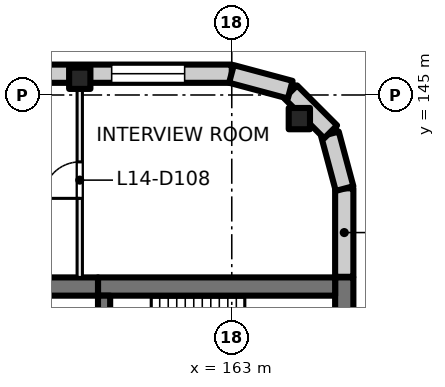
"""IFC4 building model, lengths in metres.
Left out: names, types, materials, properties, quantities, classifications, styles, units other than length and angle.
Written with IfcOpenShell. Run it as: python <this file> out.ifc"""

import sys

from ifc_helpers import new_model, si_unit, direction, frame, frame_2d, origin, origin_2d, place, context, subcontext, project, spatial, rectangle, extrude, element, fill, save


model = new_model("IFC4")
c1 = context("Model", 3, precision=1e-05, world=origin(), true_north=direction((0.0, 1.0)))
c2 = subcontext(c1, "Body", "Model", "MODEL_VIEW")
j1 = project(units=[si_unit("LENGTHUNIT", "METRE"), si_unit("PLANEANGLEUNIT", "RADIAN")], contexts=[c1])
p1 = place(None, origin())
s1 = spatial("IfcSite", under=j1, at=p1, CompositionType="ELEMENT")
p2 = place(p1, origin())
s2 = spatial("IfcBuilding", under=s1, at=p2, CompositionType="ELEMENT")
p3 = place(p2, frame((0.0, 0.0, 63.5)))
s3 = spatial("IfcBuildingStorey", under=s2, at=p3, CompositionType="ELEMENT", Elevation=63.5)
for number, where, z_axis, x_axis in (
    (1, (165.223, 144.223, 0.0), (0.0, 0.0, 1.0), (1.0, 0.0, 0.0)),
    (2, (158.0, 145.55, 0.0), (0.0, 0.0, 1.0), (1.0, 0.0, 0.0)),
):
    element("IfcColumn", number, at=place(p3, frame(where, z_axis=z_axis, x_axis=x_axis)), inside=s3, PredefinedType="COLUMN", context=c2, shape_type="SweptSolid", body=[
        extrude(rectangle(XDim=0.7, YDim=0.7, at=origin_2d()), origin(), (0.0, 0.0, 1.0), 4.0),
    ])
p4 = place(p3, frame((166.7, 139.0, 0.0), z_axis=(0.0, 0.0, 1.0), x_axis=(0.0, -1.0, 0.0)))
e3 = element("IfcWall", 3, at=p4, inside=s3, PredefinedType="SHEAR", context=c2, shape_type="SweptSolid", body=[
    extrude(rectangle(XDim=3.8, YDim=0.6, at=frame_2d((1.9, 0.0))), origin(), (0.0, 0.0, 1.0), 4.0),
])
p5 = place(p3, frame((166.4, 138.7, 0.0), z_axis=(0.0, 0.0, 1.0), x_axis=(-1.0, 0.0, 0.0)))
e4 = element("IfcWall", 4, at=p5, inside=s3, PredefinedType="SHEAR", context=c2, shape_type="SweptSolid", body=[
    extrude(rectangle(XDim=7.8, YDim=0.6, at=frame_2d((3.9, 0.0))), origin(), (0.0, 0.0, 1.0), 4.0),
])
p6 = place(p3, frame((158.6, 138.7, 0.0), z_axis=(0.0, 0.0, 1.0), x_axis=(-1.0, 0.0, 0.0)))
e5 = element("IfcWall", 5, at=p6, inside=s3, PredefinedType="SHEAR", context=c2, shape_type="SweptSolid", body=[
    extrude(rectangle(XDim=4.6, YDim=0.6, at=frame_2d((2.3, 0.0))), origin(), (0.0, 0.0, 1.0), 4.0),
])
p7 = place(p3, frame((158.8, 138.4, 0.0), z_axis=(0.0, 0.0, 1.0), x_axis=(0.0, -1.0, 0.0)))
e6 = element("IfcWall", 6, at=p7, inside=s3, PredefinedType="SHEAR", context=c2, shape_type="SweptSolid", body=[
    extrude(rectangle(XDim=2.8, YDim=0.4, at=frame_2d((1.4, 0.0))), origin(), (0.0, 0.0, 1.0), 4.0),
])
p8 = place(p7, frame((0.9, 0.0, 0.0)))
e7 = element("IfcOpeningElement", 7, at=p8, cuts=e6, PredefinedType="OPENING", context=c2, shape_type="SweptSolid", body=[
    extrude(rectangle(XDim=1.0, YDim=2.1, at=frame_2d((0.5, 1.05))), frame((0.0, 0.21, 0.0), z_axis=(0.0, -1.0, 0.0), x_axis=(1.0, 0.0, 0.0)), (0.0, 0.0, 1.0), 0.42),
])
p9 = place(p3, frame((131.07, 145.7, 0.0), z_axis=(0.0, 0.0, 1.0), x_axis=(1.0, 0.0, 0.0)))
e8 = element("IfcWall", 8, at=p9, inside=s3, PredefinedType="SOLIDWALL", context=c2, shape_type="SweptSolid", body=[
    extrude(rectangle(XDim=31.93, YDim=0.6, at=frame_2d((15.965, 0.0))), origin(), (0.0, 0.0, 1.0), 3.625),
])
p10 = place(p9, frame((0.98, 0.0, 0.9)))
e9 = element("IfcOpeningElement", 9, at=p10, cuts=e8, PredefinedType="OPENING", context=c2, shape_type="SweptSolid", body=[
    extrude(rectangle(XDim=2.4, YDim=2.4, at=frame_2d((1.2, 1.2))), frame((0.0, 0.31, 0.0), z_axis=(0.0, -1.0, 0.0), x_axis=(1.0, 0.0, 0.0)), (0.0, 0.0, 1.0), 0.62),
])
p11 = place(p9, frame((5.48, 0.0, 0.9)))
e10 = element("IfcOpeningElement", 10, at=p11, cuts=e8, PredefinedType="OPENING", context=c2, shape_type="SweptSolid", body=[
    extrude(rectangle(XDim=2.4, YDim=2.4, at=frame_2d((1.2, 1.2))), frame((0.0, 0.31, 0.0), z_axis=(0.0, -1.0, 0.0), x_axis=(1.0, 0.0, 0.0)), (0.0, 0.0, 1.0), 0.62),
])
p12 = place(p9, frame((9.98, 0.0, 0.9)))
e11 = element("IfcOpeningElement", 11, at=p12, cuts=e8, PredefinedType="OPENING", context=c2, shape_type="SweptSolid", body=[
    extrude(rectangle(XDim=2.4, YDim=2.4, at=frame_2d((1.2, 1.2))), frame((0.0, 0.31, 0.0), z_axis=(0.0, -1.0, 0.0), x_axis=(1.0, 0.0, 0.0)), (0.0, 0.0, 1.0), 0.62),
])
p13 = place(p9, frame((14.48, 0.0, 0.9)))
e12 = element("IfcOpeningElement", 12, at=p13, cuts=e8, PredefinedType="OPENING", context=c2, shape_type="SweptSolid", body=[
    extrude(rectangle(XDim=2.4, YDim=2.4, at=frame_2d((1.2, 1.2))), frame((0.0, 0.31, 0.0), z_axis=(0.0, -1.0, 0.0), x_axis=(1.0, 0.0, 0.0)), (0.0, 0.0, 1.0), 0.62),
])
p14 = place(p9, frame((18.98, 0.0, 0.9)))
e13 = element("IfcOpeningElement", 13, at=p14, cuts=e8, PredefinedType="OPENING", context=c2, shape_type="SweptSolid", body=[
    extrude(rectangle(XDim=2.4, YDim=2.4, at=frame_2d((1.2, 1.2))), frame((0.0, 0.31, 0.0), z_axis=(0.0, -1.0, 0.0), x_axis=(1.0, 0.0, 0.0)), (0.0, 0.0, 1.0), 0.62),
])
p15 = place(p9, frame((23.48, 0.0, 0.9)))
e14 = element("IfcOpeningElement", 14, at=p15, cuts=e8, PredefinedType="OPENING", context=c2, shape_type="SweptSolid", body=[
    extrude(rectangle(XDim=2.4, YDim=2.4, at=frame_2d((1.2, 1.2))), frame((0.0, 0.31, 0.0), z_axis=(0.0, -1.0, 0.0), x_axis=(1.0, 0.0, 0.0)), (0.0, 0.0, 1.0), 0.62),
])
p16 = place(p9, frame((27.98, 0.0, 0.9)))
e15 = element("IfcOpeningElement", 15, at=p16, cuts=e8, PredefinedType="OPENING", context=c2, shape_type="SweptSolid", body=[
    extrude(rectangle(XDim=2.4, YDim=2.4, at=frame_2d((1.2, 1.2))), frame((0.0, 0.31, 0.0), z_axis=(0.0, -1.0, 0.0), x_axis=(1.0, 0.0, 0.0)), (0.0, 0.0, 1.0), 0.62),
])
p17 = place(p3, frame((166.7, 141.93, 0.0), z_axis=(0.0, 0.0, 1.0), x_axis=(0.0, -1.0, 0.0)))
e16 = element("IfcWall", 16, at=p17, inside=s3, PredefinedType="SOLIDWALL", context=c2, shape_type="SweptSolid", body=[
    extrude(rectangle(XDim=2.91, YDim=0.6, at=frame_2d((1.455, 0.0))), origin(), (0.0, 0.0, 1.0), 3.625),
])
for number, where, z_axis, x_axis in (
    (17, (166.229, 143.719, 0.0), (0.0, 0.0, 1.0), (0.259, -0.966, 0.0)),
    (18, (164.936, 145.104, 0.0), (0.0, 0.0, 1.0), (0.707, -0.707, 0.0)),
):
    element("IfcWall", number, at=place(p3, frame(where, z_axis=z_axis, x_axis=x_axis)), inside=s3, PredefinedType="SOLIDWALL", context=c2, shape_type="SweptSolid", body=[
        extrude(rectangle(XDim=1.861, YDim=0.6, at=frame_2d((0.93, 0.0))), origin(), (0.0, 0.0, 1.0), 3.625),
    ])
p18 = place(p3, frame((162.99, 145.692, 0.0), z_axis=(0.0, 0.0, 1.0), x_axis=(0.965920269068, -0.258839784042, 0.0)))
e19 = element("IfcWall", 19, at=p18, inside=s3, PredefinedType="SOLIDWALL", context=c2, shape_type="SweptSolid", body=[
    extrude(rectangle(XDim=2.0, YDim=0.6, at=frame_2d((1.0, 0.0))), origin(), (0.0, 0.0, 1.0), 3.625),
])
p19 = place(p3, frame((158.0, 139.0, 0.0), z_axis=(0.0, 0.0, 1.0), x_axis=(0.0, 1.0, 0.0)))
e20 = element("IfcWall", 20, at=p19, inside=s3, PredefinedType="PARTITIONING", context=c2, shape_type="SweptSolid", body=[
    extrude(rectangle(XDim=6.4, YDim=0.175, at=frame_2d((3.2, 0.0))), origin(), (0.0, 0.0, 1.0), 3.625),
])
p20 = place(p19, frame((2.6, 0.0, 0.0)))
e21 = element("IfcOpeningElement", 21, at=p20, cuts=e20, PredefinedType="OPENING", context=c2, shape_type="SweptSolid", body=[
    extrude(rectangle(XDim=1.2, YDim=2.1, at=frame_2d((0.6, 1.05))), frame((0.0, 0.097, 0.0), z_axis=(0.0, -1.0, 0.0), x_axis=(1.0, 0.0, 0.0)), (0.0, 0.0, 1.0), 0.195),
])
p21 = place(p16, origin())
e22 = element("IfcWindow", 22, at=p21, inside=s3, PartitioningType="SINGLE_PANEL", PredefinedType="WINDOW", context=c2, shape_type="SweptSolid", body=[
    extrude(rectangle(XDim=2.4, YDim=2.4, at=frame_2d((1.2, 1.2))), frame((0.0, 0.03, 0.0), z_axis=(0.0, -1.0, 0.0), x_axis=(1.0, 0.0, 0.0)), (0.0, 0.0, 1.0), 0.06),
])
fill(e15, e22)
p22 = place(p20, origin())
e23 = element("IfcDoor", 23, at=p22, inside=s3, OperationType="DOUBLE_DOOR_SINGLE_SWING", PredefinedType="DOOR", context=c2, shape_type="SweptSolid", body=[
    extrude(rectangle(XDim=1.2, YDim=2.1, at=frame_2d((0.6, 1.05))), frame((0.0, 0.025, 0.0), z_axis=(0.0, -1.0, 0.0), x_axis=(1.0, 0.0, 0.0)), (0.0, 0.0, 1.0), 0.05),
])
fill(e21, e23)
save(model, sys.argv[1])
